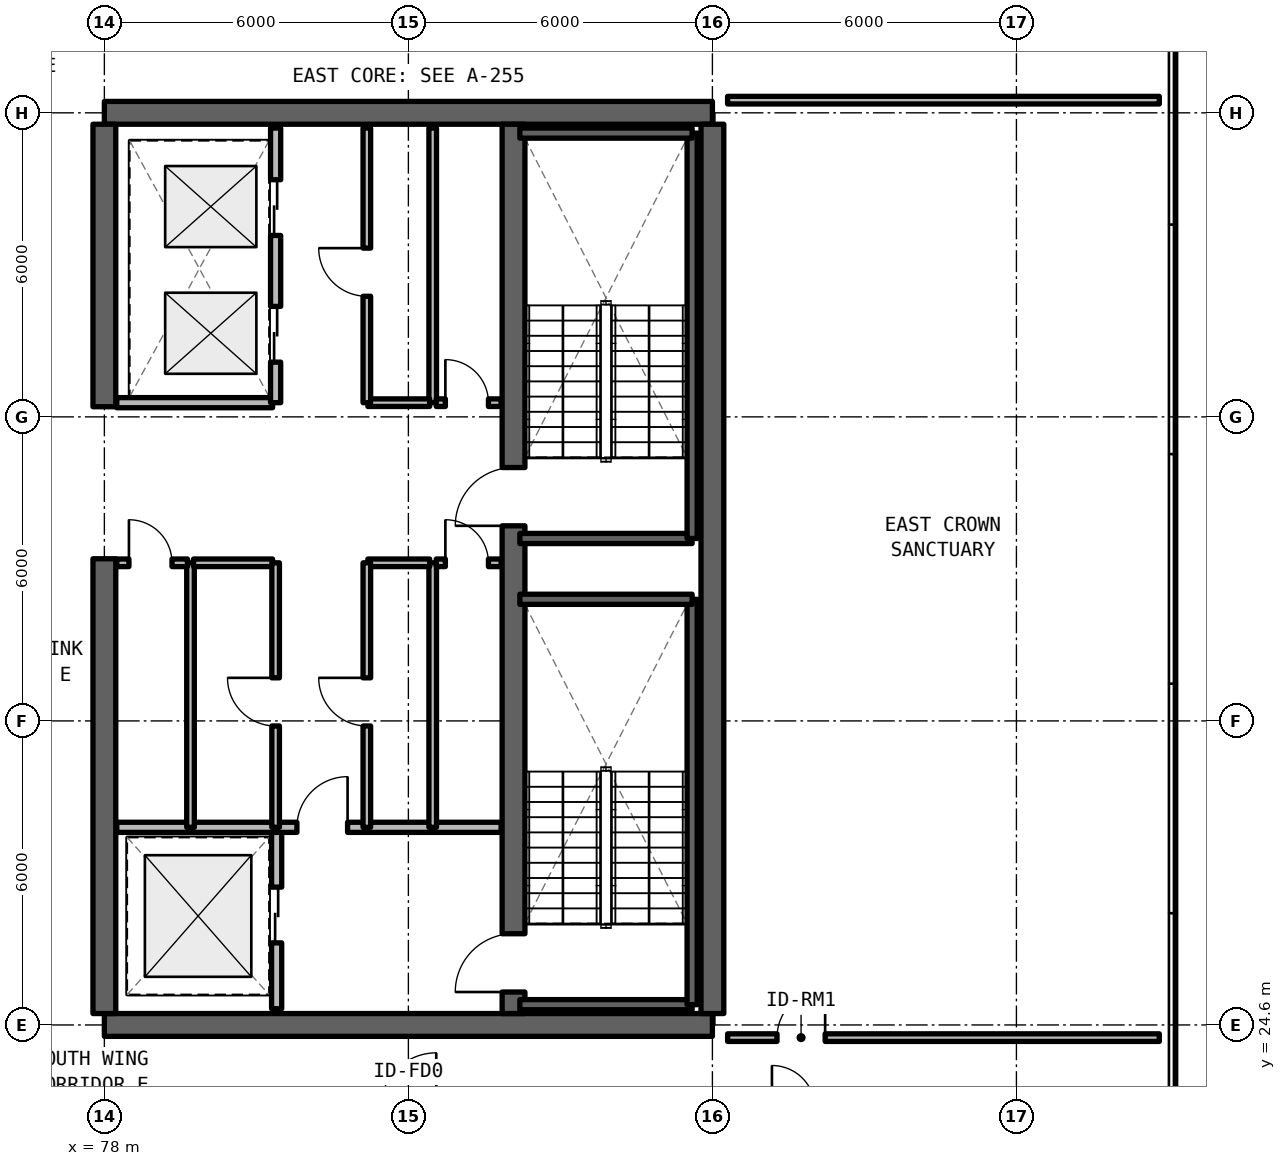
"""IFC4 building model, lengths in metres.
Left out: names, types, materials, properties, quantities, classifications, styles, units other than length and angle.
Written with IfcOpenShell. Run it as: python <this file> out.ifc"""

import sys

from ifc_helpers import new_model, si_unit, direction, frame, frame_2d, origin, place, context, subcontext, project, spatial, rectangle, extrude, element, fill, save


model = new_model("IFC4")
c1 = context("Model", 3, precision=1e-05, world=origin(), true_north=direction((0.0, 1.0)))
c2 = subcontext(c1, "Body", "Model", "MODEL_VIEW")
j1 = project(units=[si_unit("LENGTHUNIT", "METRE"), si_unit("PLANEANGLEUNIT", "RADIAN")], contexts=[c1])
p1 = place(None, origin())
s1 = spatial("IfcSite", under=j1, at=p1, CompositionType="ELEMENT")
p2 = place(p1, origin())
s2 = spatial("IfcBuilding", under=s1, at=p2, CompositionType="ELEMENT")
p3 = place(p2, frame((0.0, 0.0, 253.44)))
s3 = spatial("IfcBuildingStorey", under=s2, at=p3, CompositionType="ELEMENT", Elevation=253.44)
for number, where, z_axis, x_axis in (
    (1, (78.0, 24.6, 0.0), (0.0, 0.0, 1.0), (1.0, 0.0, 0.0)),
    (2, (90.0, 42.6, 0.0), (0.0, 0.0, 1.0), (-1.0, 0.0, 0.0)),
):
    element("IfcWall", number, at=place(p3, frame(where, z_axis=z_axis, x_axis=x_axis)), inside=s3, PredefinedType="SHEAR", context=c2, shape_type="SweptSolid", body=[
        extrude(rectangle(XDim=12.0, YDim=0.45, at=frame_2d((6.0, 0.0))), origin(), (0.0, 0.0, 1.0), 3.63),
    ])
p4 = place(p3, frame((90.0, 24.825, 0.0), z_axis=(0.0, 0.0, 1.0), x_axis=(0.0, 1.0, 0.0)))
e3 = element("IfcWall", 3, at=p4, inside=s3, PredefinedType="SHEAR", context=c2, shape_type="SweptSolid", body=[
    extrude(rectangle(XDim=17.55, YDim=0.45, at=frame_2d((8.775, 0.0))), origin(), (0.0, 0.0, 1.0), 3.63),
])
p5 = place(p3, frame((78.0, 24.825, 0.0), z_axis=(0.0, 0.0, 1.0), x_axis=(0.0, 1.0, 0.0)))
e4 = element("IfcWall", 4, at=p5, inside=s3, PredefinedType="SHEAR", context=c2, shape_type="SweptSolid", body=[
    extrude(rectangle(XDim=8.975, YDim=0.45, at=frame_2d((4.488, 0.0))), origin(), (0.0, 0.0, 1.0), 3.63),
])
p6 = place(p3, frame((78.0, 36.8, 0.0), z_axis=(0.0, 0.0, 1.0), x_axis=(0.0, 1.0, 0.0)))
e5 = element("IfcWall", 5, at=p6, inside=s3, PredefinedType="SHEAR", context=c2, shape_type="SweptSolid", body=[
    extrude(rectangle(XDim=5.575, YDim=0.45, at=frame_2d((2.788, 0.0))), origin(), (0.0, 0.0, 1.0), 3.63),
])
p7 = place(p3, frame((86.075, 24.825, 0.0), z_axis=(0.0, 0.0, 1.0), x_axis=(0.0, 1.0, 0.0)))
e6 = element("IfcWall", 6, at=p7, inside=s3, PredefinedType="SHEAR", context=c2, shape_type="SweptSolid", body=[
    extrude(rectangle(XDim=17.55, YDim=0.45, at=frame_2d((8.775, 0.0))), origin(), (0.0, 0.0, 1.0), 3.63),
])
p8 = place(p7, frame((0.425, 0.0, 0.0)))
e7 = element("IfcOpeningElement", 7, at=p8, cuts=e6, PredefinedType="OPENING", context=c2, shape_type="SweptSolid", body=[
    extrude(rectangle(XDim=1.15, YDim=2.15, at=frame_2d((0.575, 1.075))), frame((0.0, 0.235, 0.0), z_axis=(0.0, -1.0, 0.0), x_axis=(1.0, 0.0, 0.0)), (0.0, 0.0, 1.0), 0.47),
])
p9 = place(p7, frame((9.625, 0.0, 0.0)))
e8 = element("IfcOpeningElement", 8, at=p9, cuts=e6, PredefinedType="OPENING", context=c2, shape_type="SweptSolid", body=[
    extrude(rectangle(XDim=1.15, YDim=2.15, at=frame_2d((0.575, 1.075))), frame((0.0, 0.235, 0.0), z_axis=(0.0, -1.0, 0.0), x_axis=(1.0, 0.0, 0.0)), (0.0, 0.0, 1.0), 0.47),
])
p10 = place(p3, frame((81.4, 24.92, 0.0), z_axis=(0.0, 0.0, 1.0), x_axis=(0.0, 1.0, 0.0)))
e9 = element("IfcWall", 9, at=p10, inside=s3, PredefinedType="SOLIDWALL", context=c2, shape_type="SweptSolid", body=[
    extrude(rectangle(XDim=3.58, YDim=0.2, at=frame_2d((1.79, 0.0))), origin(), (0.0, 0.0, 1.0), 2.63),
])
p11 = place(p10, frame((1.3, 0.0, 0.0)))
e10 = element("IfcOpeningElement", 10, at=p11, cuts=e9, PredefinedType="OPENING", context=c2, shape_type="SweptSolid", body=[
    extrude(rectangle(XDim=1.1, YDim=2.2, at=frame_2d((0.55, 1.1))), frame((0.0, 0.11, 0.0), z_axis=(0.0, -1.0, 0.0), x_axis=(1.0, 0.0, 0.0)), (0.0, 0.0, 1.0), 0.22),
])
p12 = place(p3, frame((78.245, 28.5, 0.0), z_axis=(0.0, 0.0, 1.0), x_axis=(1.0, 0.0, 0.0)))
e11 = element("IfcWall", 11, at=p12, inside=s3, PredefinedType="SOLIDWALL", context=c2, shape_type="SweptSolid", body=[
    extrude(rectangle(XDim=7.585, YDim=0.2, at=frame_2d((3.792, 0.0))), origin(), (0.0, 0.0, 1.0), 2.63),
])
p13 = place(p12, frame((3.555, 0.0, 0.0)))
e12 = element("IfcOpeningElement", 12, at=p13, cuts=e11, PredefinedType="OPENING", context=c2, shape_type="SweptSolid", body=[
    extrude(rectangle(XDim=1.0, YDim=2.15, at=frame_2d((0.5, 1.075))), frame((0.0, 0.11, 0.0), z_axis=(0.0, -1.0, 0.0), x_axis=(1.0, 0.0, 0.0)), (0.0, 0.0, 1.0), 0.22),
])
p14 = place(p3, frame((84.48, 28.5, 0.0), z_axis=(0.0, 0.0, 1.0), x_axis=(0.0, 1.0, 0.0)))
e13 = element("IfcWall", 13, at=p14, inside=s3, PredefinedType="SOLIDWALL", context=c2, shape_type="SweptSolid", body=[
    extrude(rectangle(XDim=5.22, YDim=0.15, at=frame_2d((2.61, 0.0))), origin(), (0.0, 0.0, 1.0), 2.63),
])
p15 = place(p3, frame((84.55, 33.72, 0.0), z_axis=(0.0, 0.0, 1.0), x_axis=(1.0, 0.0, 0.0)))
e14 = element("IfcWall", 14, at=p15, inside=s3, PredefinedType="SOLIDWALL", context=c2, shape_type="SweptSolid", body=[
    extrude(rectangle(XDim=1.28, YDim=0.15, at=frame_2d((0.64, 0.0))), origin(), (0.0, 0.0, 1.0), 2.63),
])
p16 = place(p15, frame((0.18, 0.0, 0.0)))
e15 = element("IfcOpeningElement", 15, at=p16, cuts=e14, PredefinedType="OPENING", context=c2, shape_type="SweptSolid", body=[
    extrude(rectangle(XDim=0.85, YDim=2.1, at=frame_2d((0.425, 1.05))), frame((0.0, 0.085, 0.0), z_axis=(0.0, -1.0, 0.0), x_axis=(1.0, 0.0, 0.0)), (0.0, 0.0, 1.0), 0.17),
])
p17 = place(p3, frame((83.2, 33.72, 0.0), z_axis=(0.0, 0.0, 1.0), x_axis=(1.0, 0.0, 0.0)))
e16 = element("IfcWall", 16, at=p17, inside=s3, PredefinedType="SOLIDWALL", context=c2, shape_type="SweptSolid", body=[
    extrude(rectangle(XDim=1.22, YDim=0.15, at=frame_2d((0.61, 0.0))), origin(), (0.0, 0.0, 1.0), 2.63),
])
p18 = place(p3, frame((83.18, 28.5, 0.0), z_axis=(0.0, 0.0, 1.0), x_axis=(0.0, 1.0, 0.0)))
e17 = element("IfcWall", 17, at=p18, inside=s3, PredefinedType="SOLIDWALL", context=c2, shape_type="SweptSolid", body=[
    extrude(rectangle(XDim=5.22, YDim=0.15, at=frame_2d((2.61, 0.0))), origin(), (0.0, 0.0, 1.0), 2.63),
])
p19 = place(p18, frame((2.0, 0.0, 0.0)))
e18 = element("IfcOpeningElement", 18, at=p19, cuts=e17, PredefinedType="OPENING", context=c2, shape_type="SweptSolid", body=[
    extrude(rectangle(XDim=0.95, YDim=2.15, at=frame_2d((0.475, 1.075))), frame((0.0, 0.085, 0.0), z_axis=(0.0, -1.0, 0.0), x_axis=(1.0, 0.0, 0.0)), (0.0, 0.0, 1.0), 0.17),
])
p20 = place(p3, frame((79.7, 28.5, 0.0), z_axis=(0.0, 0.0, 1.0), x_axis=(0.0, 1.0, 0.0)))
e19 = element("IfcWall", 19, at=p20, inside=s3, PredefinedType="SOLIDWALL", context=c2, shape_type="SweptSolid", body=[
    extrude(rectangle(XDim=5.22, YDim=0.15, at=frame_2d((2.61, 0.0))), origin(), (0.0, 0.0, 1.0), 2.63),
])
p21 = place(p3, frame((79.76, 33.72, 0.0), z_axis=(0.0, 0.0, 1.0), x_axis=(1.0, 0.0, 0.0)))
e20 = element("IfcWall", 20, at=p21, inside=s3, PredefinedType="SOLIDWALL", context=c2, shape_type="SweptSolid", body=[
    extrude(rectangle(XDim=1.56, YDim=0.15, at=frame_2d((0.78, 0.0))), origin(), (0.0, 0.0, 1.0), 2.63),
])
p22 = place(p3, frame((78.245, 33.72, 0.0), z_axis=(0.0, 0.0, 1.0), x_axis=(1.0, 0.0, 0.0)))
e21 = element("IfcWall", 21, at=p22, inside=s3, PredefinedType="SOLIDWALL", context=c2, shape_type="SweptSolid", body=[
    extrude(rectangle(XDim=1.395, YDim=0.15, at=frame_2d((0.697, 0.0))), origin(), (0.0, 0.0, 1.0), 2.63),
])
p23 = place(p22, frame((0.24, 0.0, 0.0)))
e22 = element("IfcOpeningElement", 22, at=p23, cuts=e21, PredefinedType="OPENING", context=c2, shape_type="SweptSolid", body=[
    extrude(rectangle(XDim=0.85, YDim=2.1, at=frame_2d((0.425, 1.05))), frame((0.0, 0.085, 0.0), z_axis=(0.0, -1.0, 0.0), x_axis=(1.0, 0.0, 0.0)), (0.0, 0.0, 1.0), 0.17),
])
p24 = place(p3, frame((81.38, 28.5, 0.0), z_axis=(0.0, 0.0, 1.0), x_axis=(0.0, 1.0, 0.0)))
e23 = element("IfcWall", 23, at=p24, inside=s3, PredefinedType="SOLIDWALL", context=c2, shape_type="SweptSolid", body=[
    extrude(rectangle(XDim=5.22, YDim=0.15, at=frame_2d((2.61, 0.0))), origin(), (0.0, 0.0, 1.0), 2.63),
])
p25 = place(p24, frame((2.0, 0.0, 0.0)))
e24 = element("IfcOpeningElement", 24, at=p25, cuts=e23, PredefinedType="OPENING", context=c2, shape_type="SweptSolid", body=[
    extrude(rectangle(XDim=0.95, YDim=2.15, at=frame_2d((0.475, 1.075))), frame((0.0, 0.085, 0.0), z_axis=(0.0, -1.0, 0.0), x_axis=(1.0, 0.0, 0.0)), (0.0, 0.0, 1.0), 0.17),
])
p26 = place(p3, frame((84.48, 36.88, 0.0), z_axis=(0.0, 0.0, 1.0), x_axis=(0.0, 1.0, 0.0)))
e25 = element("IfcWall", 25, at=p26, inside=s3, PredefinedType="SOLIDWALL", context=c2, shape_type="SweptSolid", body=[
    extrude(rectangle(XDim=5.42, YDim=0.15, at=frame_2d((2.71, 0.0))), origin(), (0.0, 0.0, 1.0), 2.63),
])
p27 = place(p3, frame((84.55, 36.88, 0.0), z_axis=(0.0, 0.0, 1.0), x_axis=(1.0, 0.0, 0.0)))
e26 = element("IfcWall", 26, at=p27, inside=s3, PredefinedType="SOLIDWALL", context=c2, shape_type="SweptSolid", body=[
    extrude(rectangle(XDim=1.28, YDim=0.15, at=frame_2d((0.64, 0.0))), origin(), (0.0, 0.0, 1.0), 2.63),
])
p28 = place(p27, frame((0.18, 0.0, 0.0)))
e27 = element("IfcOpeningElement", 27, at=p28, cuts=e26, PredefinedType="OPENING", context=c2, shape_type="SweptSolid", body=[
    extrude(rectangle(XDim=0.85, YDim=2.1, at=frame_2d((0.425, 1.05))), frame((0.0, 0.085, 0.0), z_axis=(0.0, -1.0, 0.0), x_axis=(1.0, 0.0, 0.0)), (0.0, 0.0, 1.0), 0.17),
])
p29 = place(p3, frame((83.2, 36.88, 0.0), z_axis=(0.0, 0.0, 1.0), x_axis=(1.0, 0.0, 0.0)))
e28 = element("IfcWall", 28, at=p29, inside=s3, PredefinedType="SOLIDWALL", context=c2, shape_type="SweptSolid", body=[
    extrude(rectangle(XDim=1.22, YDim=0.15, at=frame_2d((0.61, 0.0))), origin(), (0.0, 0.0, 1.0), 2.63),
])
p30 = place(p3, frame((83.18, 36.88, 0.0), z_axis=(0.0, 0.0, 1.0), x_axis=(0.0, 1.0, 0.0)))
e29 = element("IfcWall", 29, at=p30, inside=s3, PredefinedType="SOLIDWALL", context=c2, shape_type="SweptSolid", body=[
    extrude(rectangle(XDim=5.42, YDim=0.15, at=frame_2d((2.71, 0.0))), origin(), (0.0, 0.0, 1.0), 2.63),
])
p31 = place(p30, frame((2.1, 0.0, 0.0)))
e30 = element("IfcOpeningElement", 30, at=p31, cuts=e29, PredefinedType="OPENING", context=c2, shape_type="SweptSolid", body=[
    extrude(rectangle(XDim=0.95, YDim=2.15, at=frame_2d((0.475, 1.075))), frame((0.0, 0.085, 0.0), z_axis=(0.0, -1.0, 0.0), x_axis=(1.0, 0.0, 0.0)), (0.0, 0.0, 1.0), 0.17),
])
p32 = place(p3, frame((78.245, 36.88, 0.0), z_axis=(0.0, 0.0, 1.0), x_axis=(1.0, 0.0, 0.0)))
e31 = element("IfcWall", 31, at=p32, inside=s3, PredefinedType="SOLIDWALL", context=c2, shape_type="SweptSolid", body=[
    extrude(rectangle(XDim=3.075, YDim=0.2, at=frame_2d((1.538, 0.0))), origin(), (0.0, 0.0, 1.0), 2.63),
])
p33 = place(p3, frame((81.38, 36.88, 0.0), z_axis=(0.0, 0.0, 1.0), x_axis=(0.0, 1.0, 0.0)))
e32 = element("IfcWall", 32, at=p33, inside=s3, PredefinedType="SOLIDWALL", context=c2, shape_type="SweptSolid", body=[
    extrude(rectangle(XDim=5.42, YDim=0.2, at=frame_2d((2.71, 0.0))), origin(), (0.0, 0.0, 1.0), 2.63),
])
p34 = place(p33, frame((0.8, 0.0, 0.0)))
e33 = element("IfcOpeningElement", 33, at=p34, cuts=e32, PredefinedType="OPENING", context=c2, shape_type="SweptSolid", body=[
    extrude(rectangle(XDim=1.1, YDim=2.2, at=frame_2d((0.55, 1.1))), frame((0.0, 0.11, 0.0), z_axis=(0.0, -1.0, 0.0), x_axis=(1.0, 0.0, 0.0)), (0.0, 0.0, 1.0), 0.22),
])
p35 = place(p33, frame((3.3, 0.0, 0.0)))
e34 = element("IfcOpeningElement", 34, at=p35, cuts=e32, PredefinedType="OPENING", context=c2, shape_type="SweptSolid", body=[
    extrude(rectangle(XDim=1.1, YDim=2.2, at=frame_2d((0.55, 1.1))), frame((0.0, 0.11, 0.0), z_axis=(0.0, -1.0, 0.0), x_axis=(1.0, 0.0, 0.0)), (0.0, 0.0, 1.0), 0.22),
])
p36 = place(p3, frame((90.3, 24.35, 0.0), z_axis=(0.0, 0.0, 1.0), x_axis=(1.0, 0.0, 0.0)))
e35 = element("IfcWall", 35, at=p36, inside=s3, PredefinedType="SOLIDWALL", context=c2, shape_type="SweptSolid", body=[
    extrude(rectangle(XDim=8.52, YDim=0.15, at=frame_2d((4.26, 0.0))), origin(), (0.0, 0.0, 1.0), 2.63),
])
p37 = place(p36, frame((0.975, 0.0, 0.0)))
e36 = element("IfcOpeningElement", 36, at=p37, cuts=e35, PredefinedType="OPENING", context=c2, shape_type="SweptSolid", body=[
    extrude(rectangle(XDim=0.95, YDim=2.15, at=frame_2d((0.475, 1.075))), frame((0.0, 0.085, 0.0), z_axis=(0.0, -1.0, 0.0), x_axis=(1.0, 0.0, 0.0)), (0.0, 0.0, 1.0), 0.17),
])
p38 = place(p3, frame((90.3, 42.85, 0.0), z_axis=(0.0, 0.0, 1.0), x_axis=(1.0, 0.0, 0.0)))
e37 = element("IfcWall", 37, at=p38, inside=s3, PredefinedType="SOLIDWALL", context=c2, shape_type="SweptSolid", body=[
    extrude(rectangle(XDim=8.52, YDim=0.15, at=frame_2d((4.26, 0.0))), origin(), (0.0, 0.0, 1.0), 2.63),
])
p39 = place(p3, frame((86.2, 25.0, 0.0), z_axis=(0.0, 0.0, 1.0), x_axis=(1.0, 0.0, 0.0)))
e38 = element("IfcWall", 38, at=p39, inside=s3, PredefinedType="SOLIDWALL", context=c2, shape_type="SweptSolid", body=[
    extrude(rectangle(XDim=3.4, YDim=0.2, at=frame_2d((1.7, 0.0))), origin(), (0.0, 0.0, 1.0), 3.63),
])
p40 = place(p3, frame((89.6, 25.0, 0.0), z_axis=(0.0, 0.0, 1.0), x_axis=(0.0, 1.0, 0.0)))
e39 = element("IfcWall", 39, at=p40, inside=s3, PredefinedType="SOLIDWALL", context=c2, shape_type="SweptSolid", body=[
    extrude(rectangle(XDim=8.0, YDim=0.2, at=frame_2d((4.0, 0.0))), origin(), (0.0, 0.0, 1.0), 3.63),
])
for number, where, z_axis, x_axis in (
    (40, (89.6, 33.0, 0.0), (0.0, 0.0, 1.0), (-1.0, 0.0, 0.0)),
    (41, (86.2, 34.2, 0.0), (0.0, 0.0, 1.0), (1.0, 0.0, 0.0)),
):
    element("IfcWall", number, at=place(p3, frame(where, z_axis=z_axis, x_axis=x_axis)), inside=s3, PredefinedType="SOLIDWALL", context=c2, shape_type="SweptSolid", body=[
        extrude(rectangle(XDim=3.4, YDim=0.2, at=frame_2d((1.7, 0.0))), origin(), (0.0, 0.0, 1.0), 3.63),
    ])
p41 = place(p3, frame((89.6, 34.2, 0.0), z_axis=(0.0, 0.0, 1.0), x_axis=(0.0, 1.0, 0.0)))
e42 = element("IfcWall", 42, at=p41, inside=s3, PredefinedType="SOLIDWALL", context=c2, shape_type="SweptSolid", body=[
    extrude(rectangle(XDim=8.0, YDim=0.2, at=frame_2d((4.0, 0.0))), origin(), (0.0, 0.0, 1.0), 3.63),
])
p42 = place(p3, frame((89.6, 42.2, 0.0), z_axis=(0.0, 0.0, 1.0), x_axis=(-1.0, 0.0, 0.0)))
e43 = element("IfcWall", 43, at=p42, inside=s3, PredefinedType="SOLIDWALL", context=c2, shape_type="SweptSolid", body=[
    extrude(rectangle(XDim=3.4, YDim=0.2, at=frame_2d((1.7, 0.0))), origin(), (0.0, 0.0, 1.0), 3.63),
])
p43 = place(p11, origin())
e44 = element("IfcDoor", 44, at=p43, inside=s3, OperationType="SLIDING_TO_LEFT", PredefinedType="DOOR", context=c2, shape_type="SweptSolid", body=[
    extrude(rectangle(XDim=1.1, YDim=2.2, at=frame_2d((0.55, 1.1))), frame((0.0, 0.025, 0.0), z_axis=(0.0, -1.0, 0.0), x_axis=(1.0, 0.0, 0.0)), (0.0, 0.0, 1.0), 0.05),
])
fill(e10, e44)
p44 = place(p13, origin())
e45 = element("IfcDoor", 45, at=p44, inside=s3, OperationType="SINGLE_SWING_RIGHT", PredefinedType="DOOR", context=c2, shape_type="SweptSolid", body=[
    extrude(rectangle(XDim=1.0, YDim=2.15, at=frame_2d((0.5, 1.075))), frame((0.0, 0.025, 0.0), z_axis=(0.0, -1.0, 0.0), x_axis=(1.0, 0.0, 0.0)), (0.0, 0.0, 1.0), 0.05),
])
fill(e12, e45)
p45 = place(p16, origin())
e46 = element("IfcDoor", 46, at=p45, inside=s3, OperationType="SINGLE_SWING_LEFT", PredefinedType="DOOR", context=c2, shape_type="SweptSolid", body=[
    extrude(rectangle(XDim=0.85, YDim=2.1, at=frame_2d((0.425, 1.05))), frame((0.0, 0.025, 0.0), z_axis=(0.0, -1.0, 0.0), x_axis=(1.0, 0.0, 0.0)), (0.0, 0.0, 1.0), 0.05),
])
fill(e15, e46)
p46 = place(p19, origin())
e47 = element("IfcDoor", 47, at=p46, inside=s3, OperationType="SINGLE_SWING_RIGHT", PredefinedType="DOOR", context=c2, shape_type="SweptSolid", body=[
    extrude(rectangle(XDim=0.95, YDim=2.15, at=frame_2d((0.475, 1.075))), frame((0.0, 0.025, 0.0), z_axis=(0.0, -1.0, 0.0), x_axis=(1.0, 0.0, 0.0)), (0.0, 0.0, 1.0), 0.05),
])
fill(e18, e47)
p47 = place(p23, origin())
e48 = element("IfcDoor", 48, at=p47, inside=s3, OperationType="SINGLE_SWING_LEFT", PredefinedType="DOOR", context=c2, shape_type="SweptSolid", body=[
    extrude(rectangle(XDim=0.85, YDim=2.1, at=frame_2d((0.425, 1.05))), frame((0.0, 0.025, 0.0), z_axis=(0.0, -1.0, 0.0), x_axis=(1.0, 0.0, 0.0)), (0.0, 0.0, 1.0), 0.05),
])
fill(e22, e48)
p48 = place(p25, origin())
e49 = element("IfcDoor", 49, at=p48, inside=s3, OperationType="SINGLE_SWING_RIGHT", PredefinedType="DOOR", context=c2, shape_type="SweptSolid", body=[
    extrude(rectangle(XDim=0.95, YDim=2.15, at=frame_2d((0.475, 1.075))), frame((0.0, 0.025, 0.0), z_axis=(0.0, -1.0, 0.0), x_axis=(1.0, 0.0, 0.0)), (0.0, 0.0, 1.0), 0.05),
])
fill(e24, e49)
p49 = place(p28, origin())
e50 = element("IfcDoor", 50, at=p49, inside=s3, OperationType="SINGLE_SWING_LEFT", PredefinedType="DOOR", context=c2, shape_type="SweptSolid", body=[
    extrude(rectangle(XDim=0.85, YDim=2.1, at=frame_2d((0.425, 1.05))), frame((0.0, 0.025, 0.0), z_axis=(0.0, -1.0, 0.0), x_axis=(1.0, 0.0, 0.0)), (0.0, 0.0, 1.0), 0.05),
])
fill(e27, e50)
p50 = place(p31, origin())
e51 = element("IfcDoor", 51, at=p50, inside=s3, OperationType="SINGLE_SWING_RIGHT", PredefinedType="DOOR", context=c2, shape_type="SweptSolid", body=[
    extrude(rectangle(XDim=0.95, YDim=2.15, at=frame_2d((0.475, 1.075))), frame((0.0, 0.025, 0.0), z_axis=(0.0, -1.0, 0.0), x_axis=(1.0, 0.0, 0.0)), (0.0, 0.0, 1.0), 0.05),
])
fill(e30, e51)
p51 = place(p34, origin())
e52 = element("IfcDoor", 52, at=p51, inside=s3, OperationType="SLIDING_TO_LEFT", PredefinedType="DOOR", context=c2, shape_type="SweptSolid", body=[
    extrude(rectangle(XDim=1.1, YDim=2.2, at=frame_2d((0.55, 1.1))), frame((0.0, 0.025, 0.0), z_axis=(0.0, -1.0, 0.0), x_axis=(1.0, 0.0, 0.0)), (0.0, 0.0, 1.0), 0.05),
])
fill(e33, e52)
p52 = place(p35, origin())
e53 = element("IfcDoor", 53, at=p52, inside=s3, OperationType="SLIDING_TO_RIGHT", PredefinedType="DOOR", context=c2, shape_type="SweptSolid", body=[
    extrude(rectangle(XDim=1.1, YDim=2.2, at=frame_2d((0.55, 1.1))), frame((0.0, 0.025, 0.0), z_axis=(0.0, -1.0, 0.0), x_axis=(1.0, 0.0, 0.0)), (0.0, 0.0, 1.0), 0.05),
])
fill(e34, e53)
p53 = place(p37, origin())
e54 = element("IfcDoor", 54, at=p53, inside=s3, OperationType="SINGLE_SWING_RIGHT", PredefinedType="DOOR", context=c2, shape_type="SweptSolid", body=[
    extrude(rectangle(XDim=0.95, YDim=2.15, at=frame_2d((0.475, 1.075))), frame((0.0, 0.025, 0.0), z_axis=(0.0, -1.0, 0.0), x_axis=(1.0, 0.0, 0.0)), (0.0, 0.0, 1.0), 0.05),
])
fill(e36, e54)
p54 = place(p8, origin())
e55 = element("IfcDoor", 55, at=p54, inside=s3, OperationType="SINGLE_SWING_RIGHT", PredefinedType="DOOR", context=c2, shape_type="SweptSolid", body=[
    extrude(rectangle(XDim=1.15, YDim=2.15, at=frame_2d((0.575, 1.075))), frame((0.0, 0.025, 0.0), z_axis=(0.0, -1.0, 0.0), x_axis=(1.0, 0.0, 0.0)), (0.0, 0.0, 1.0), 0.05),
])
fill(e7, e55)
p55 = place(p9, origin())
e56 = element("IfcDoor", 56, at=p55, inside=s3, OperationType="SINGLE_SWING_LEFT", PredefinedType="DOOR", context=c2, shape_type="SweptSolid", body=[
    extrude(rectangle(XDim=1.15, YDim=2.15, at=frame_2d((0.575, 1.075))), frame((0.0, 0.025, 0.0), z_axis=(0.0, -1.0, 0.0), x_axis=(1.0, 0.0, 0.0)), (0.0, 0.0, 1.0), 0.05),
])
fill(e8, e56)
save(model, sys.argv[1])
